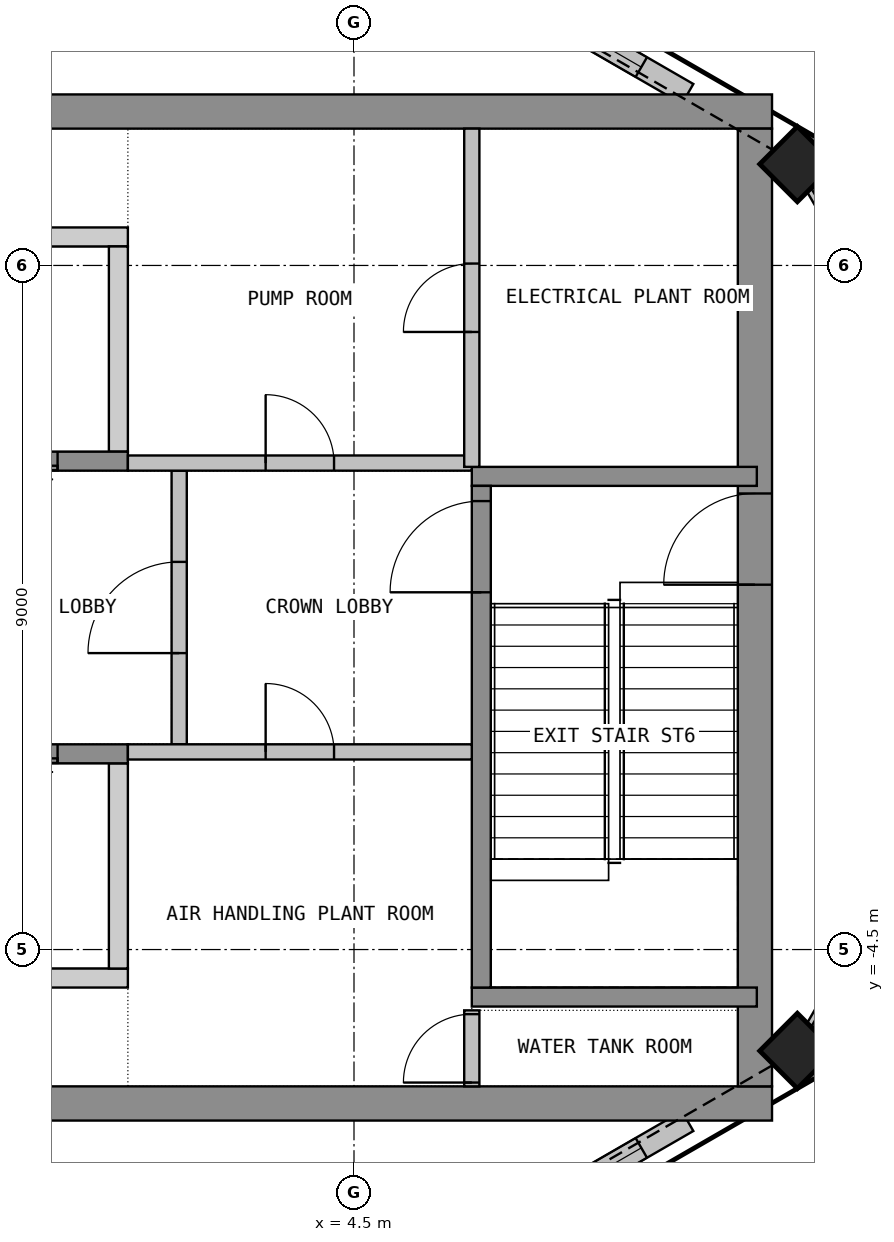
"""IFC4 building model, lengths in metres.
Left out: names, types, materials, properties, quantities, classifications, styles, units other than length and angle.
Written with IfcOpenShell. Run it as: python <this file> out.ifc"""

import sys

from ifc_helpers import new_model, si_unit, direction, frame, frame_2d, origin, origin_2d, place, context, subcontext, project, spatial, polyline, rectangle, outline, extrude, element, fill, save


model = new_model("IFC4")
c1 = context("Model", 3, precision=1e-05, world=origin(), true_north=direction((0.0, 1.0)))
c2 = subcontext(c1, "Body", "Model", "MODEL_VIEW")
j1 = project(units=[si_unit("LENGTHUNIT", "METRE"), si_unit("PLANEANGLEUNIT", "RADIAN")], contexts=[c1])
p1 = place(None, origin())
s1 = spatial("IfcSite", under=j1, at=p1, CompositionType="ELEMENT")
p2 = place(p1, origin())
s2 = spatial("IfcBuilding", under=s1, at=p2, CompositionType="ELEMENT")
p3 = place(p2, frame((0.0, 0.0, 332.4)))
s3 = spatial("IfcBuildingStorey", under=s2, at=p3, CompositionType="ELEMENT", Elevation=332.4)
for number, where, z_axis, x_axis in (
    (1, (10.333, -5.833, 0.0), (0.0, 0.0, 1.0), (0.707, 0.707, 0.0)),
    (2, (10.333, 5.833, 0.0), (0.0, 0.0, 1.0), (-0.707, 0.707, 0.0)),
):
    element("IfcColumn", number, at=place(p3, frame(where, z_axis=z_axis, x_axis=x_axis)), inside=s3, PredefinedType="COLUMN", context=c2, shape_type="SweptSolid", body=[
        extrude(rectangle(XDim=0.7, YDim=0.7, at=origin_2d()), origin(), (0.0, 0.0, 1.0), 4.05),
    ])
p4 = place(p3, frame((7.005, -7.846, 0.0), z_axis=(0.0, 0.0, 1.0), x_axis=(0.866060442015, 0.499939307093, 0.0)))
e3 = element("IfcWall", 3, at=p4, inside=s3, PredefinedType="SOLIDWALL", context=c2, shape_type="SweptSolid", body=[
    extrude(rectangle(XDim=2.177, YDim=0.3, at=frame_2d((1.088, 0.0))), origin(), (0.0, 0.0, 1.0), 3.15),
])
p5 = place(p4, frame((0.173, 0.0, 0.6)))
e4 = element("IfcOpeningElement", 4, at=p5, cuts=e3, PredefinedType="OPENING", context=c2, shape_type="SweptSolid", body=[
    extrude(rectangle(XDim=1.3, YDim=2.3, at=frame_2d((0.65, 1.15))), frame((0.0, 0.16, 0.0), z_axis=(0.0, -1.0, 0.0), x_axis=(1.0, 0.0, 0.0)), (0.0, 0.0, 1.0), 0.32),
])
p6 = place(p3, frame((10.592, -5.542, 0.0), z_axis=(0.0, 0.0, 1.0), x_axis=(0.499987607361, 0.86603255856, 0.0)))
e5 = element("IfcWall", 5, at=p6, inside=s3, PredefinedType="SOLIDWALL", context=c2, shape_type="SweptSolid", body=[
    extrude(rectangle(XDim=3.507, YDim=0.3, at=frame_2d((1.753, 0.0))), origin(), (0.0, 0.0, 1.0), 3.15),
])
p7 = place(p6, frame((0.553, 0.0, 0.6)))
e6 = element("IfcOpeningElement", 6, at=p7, cuts=e5, PredefinedType="OPENING", context=c2, shape_type="SweptSolid", body=[
    extrude(rectangle(XDim=2.4, YDim=2.3, at=frame_2d((1.2, 1.15))), frame((0.0, 0.16, 0.0), z_axis=(0.0, -1.0, 0.0), x_axis=(1.0, 0.0, 0.0)), (0.0, 0.0, 1.0), 0.32),
])
p8 = place(p3, frame((12.346, 2.505, 0.0), z_axis=(0.0, 0.0, 1.0), x_axis=(-0.499987607361, 0.86603255856, 0.0)))
e7 = element("IfcWall", 7, at=p8, inside=s3, PredefinedType="SOLIDWALL", context=c2, shape_type="SweptSolid", body=[
    extrude(rectangle(XDim=3.507, YDim=0.3, at=frame_2d((1.753, 0.0))), origin(), (0.0, 0.0, 1.0), 3.15),
])
p9 = place(p8, frame((0.553, 0.0, 0.6)))
e8 = element("IfcOpeningElement", 8, at=p9, cuts=e7, PredefinedType="OPENING", context=c2, shape_type="SweptSolid", body=[
    extrude(rectangle(XDim=2.4, YDim=2.3, at=frame_2d((1.2, 1.15))), frame((0.0, 0.16, 0.0), z_axis=(0.0, -1.0, 0.0), x_axis=(1.0, 0.0, 0.0)), (0.0, 0.0, 1.0), 0.32),
])
p10 = place(p3, frame((8.89, 6.758, 0.0), z_axis=(0.0, 0.0, 1.0), x_axis=(-0.866060442015, 0.499939307093, 0.0)))
e9 = element("IfcWall", 9, at=p10, inside=s3, PredefinedType="SOLIDWALL", context=c2, shape_type="SweptSolid", body=[
    extrude(rectangle(XDim=2.177, YDim=0.3, at=frame_2d((1.088, 0.0))), origin(), (0.0, 0.0, 1.0), 3.15),
])
p11 = place(p10, frame((0.704, 0.0, 0.6)))
e10 = element("IfcOpeningElement", 10, at=p11, cuts=e9, PredefinedType="OPENING", context=c2, shape_type="SweptSolid", body=[
    extrude(rectangle(XDim=1.3, YDim=2.3, at=frame_2d((0.65, 1.15))), frame((0.0, 0.16, 0.0), z_axis=(0.0, -1.0, 0.0), x_axis=(1.0, 0.0, 0.0)), (0.0, 0.0, 1.0), 0.32),
])
for number, where, z_axis, x_axis in (
    (11, (-10.0, 6.525, 0.0), (0.0, 0.0, 1.0), (1.0, 0.0, 0.0)),
    (12, (-10.0, -6.525, 0.0), (0.0, 0.0, 1.0), (1.0, 0.0, 0.0)),
):
    element("IfcWall", number, at=place(p3, frame(where, z_axis=z_axis, x_axis=x_axis)), inside=s3, PredefinedType="SHEAR", context=c2, shape_type="SweptSolid", body=[
        extrude(rectangle(XDim=20.0, YDim=0.45, at=frame_2d((10.0, 0.0))), origin(), (0.0, 0.0, 1.0), 4.05),
    ])
p12 = place(p3, frame((9.775, -6.3, 0.0), z_axis=(0.0, 0.0, 1.0), x_axis=(0.0, 1.0, 0.0)))
e13 = element("IfcWall", 13, at=p12, inside=s3, PredefinedType="SHEAR", context=c2, shape_type="SweptSolid", body=[
    extrude(rectangle(XDim=12.6, YDim=0.45, at=frame_2d((6.3, 0.0))), origin(), (0.0, 0.0, 1.0), 4.05),
])
p13 = place(p12, frame((6.6, 0.0, 0.0)))
e14 = element("IfcOpeningElement", 14, at=p13, cuts=e13, PredefinedType="OPENING", context=c2, shape_type="SweptSolid", body=[
    extrude(rectangle(XDim=1.2, YDim=2.1, at=frame_2d((0.6, 1.05))), frame((0.0, 0.235, 0.0), z_axis=(0.0, -1.0, 0.0), x_axis=(1.0, 0.0, 0.0)), (0.0, 0.0, 1.0), 0.47),
])
p14 = place(p3, origin())
e15 = element("IfcWall", 15, at=p14, inside=s3, PredefinedType="SHEAR", context=c2, shape_type="SweptSolid", body=[
    extrude(outline(polyline([(-1.525, 4.75), (1.525, 4.75), (1.525, 5.0), (-1.525, 5.0), (-1.525, 4.75)])), origin(), (0.0, 0.0, 1.0), 4.05),
])
p15 = place(p3, origin())
e16 = element("IfcWall", 16, at=p15, inside=s3, PredefinedType="SHEAR", context=c2, shape_type="SweptSolid", body=[
    extrude(outline(polyline([(1.275, 2.05), (1.525, 2.05), (1.525, 4.75), (1.275, 4.75), (1.275, 2.05)])), origin(), (0.0, 0.0, 1.0), 4.05),
])
p16 = place(p3, frame((-1.525, 1.925, 0.0), z_axis=(0.0, 0.0, 1.0), x_axis=(1.0, 0.0, 0.0)))
e17 = element("IfcWall", 17, at=p16, inside=s3, PredefinedType="SHEAR", context=c2, shape_type="SweptSolid", body=[
    extrude(rectangle(XDim=3.05, YDim=0.25, at=frame_2d((1.525, 0.0))), origin(), (0.0, 0.0, 1.0), 4.05),
])
p17 = place(p16, frame((0.925, 0.0, 0.0)))
e18 = element("IfcOpeningElement", 18, at=p17, cuts=e17, PredefinedType="OPENING", context=c2, shape_type="SweptSolid", body=[
    extrude(rectangle(XDim=1.2, YDim=2.1, at=frame_2d((0.6, 1.05))), frame((0.0, 0.135, 0.0), z_axis=(0.0, -1.0, 0.0), x_axis=(1.0, 0.0, 0.0)), (0.0, 0.0, 1.0), 0.27),
])
p18 = place(p3, origin())
e19 = element("IfcWall", 19, at=p18, inside=s3, PredefinedType="SHEAR", context=c2, shape_type="SweptSolid", body=[
    extrude(outline(polyline([(-1.525, -5.0), (1.525, -5.0), (1.525, -4.75), (-1.525, -4.75), (-1.525, -5.0)])), origin(), (0.0, 0.0, 1.0), 4.05),
])
p19 = place(p3, origin())
e20 = element("IfcWall", 20, at=p19, inside=s3, PredefinedType="SHEAR", context=c2, shape_type="SweptSolid", body=[
    extrude(outline(polyline([(1.275, -4.75), (1.525, -4.75), (1.525, -2.05), (1.275, -2.05), (1.275, -4.75)])), origin(), (0.0, 0.0, 1.0), 4.05),
])
p20 = place(p3, frame((-1.525, -1.925, 0.0), z_axis=(0.0, 0.0, 1.0), x_axis=(1.0, 0.0, 0.0)))
e21 = element("IfcWall", 21, at=p20, inside=s3, PredefinedType="SHEAR", context=c2, shape_type="SweptSolid", body=[
    extrude(rectangle(XDim=3.05, YDim=0.25, at=frame_2d((1.525, 0.0))), origin(), (0.0, 0.0, 1.0), 4.05),
])
p21 = place(p20, frame((0.925, 0.0, 0.0)))
e22 = element("IfcOpeningElement", 22, at=p21, cuts=e21, PredefinedType="OPENING", context=c2, shape_type="SweptSolid", body=[
    extrude(rectangle(XDim=1.2, YDim=2.1, at=frame_2d((0.6, 1.05))), frame((0.0, 0.135, 0.0), z_axis=(0.0, -1.0, 0.0), x_axis=(1.0, 0.0, 0.0)), (0.0, 0.0, 1.0), 0.27),
])
p22 = place(p3, frame((2.2, -1.8, 0.0), z_axis=(0.0, 0.0, 1.0), x_axis=(0.0, 1.0, 0.0)))
e23 = element("IfcWall", 23, at=p22, inside=s3, PredefinedType="PARTITIONING", context=c2, shape_type="SweptSolid", body=[
    extrude(rectangle(XDim=3.6, YDim=0.2, at=frame_2d((1.8, 0.0))), origin(), (0.0, 0.0, 1.0), 4.05),
])
p23 = place(p22, frame((1.2, 0.0, 0.0)))
e24 = element("IfcOpeningElement", 24, at=p23, cuts=e23, PredefinedType="OPENING", context=c2, shape_type="SweptSolid", body=[
    extrude(rectangle(XDim=1.2, YDim=2.1, at=frame_2d((0.6, 1.05))), frame((0.0, 0.11, 0.0), z_axis=(0.0, -1.0, 0.0), x_axis=(1.0, 0.0, 0.0)), (0.0, 0.0, 1.0), 0.22),
])
for number, where, z_axis, x_axis in (
    (25, (6.05, -5.125, 0.0), (0.0, 0.0, 1.0), (1.0, 0.0, 0.0)),
    (26, (6.05, 1.725, 0.0), (0.0, 0.0, 1.0), (1.0, 0.0, 0.0)),
):
    element("IfcWall", number, at=place(p3, frame(where, z_axis=z_axis, x_axis=x_axis)), inside=s3, PredefinedType="SHEAR", context=c2, shape_type="SweptSolid", body=[
        extrude(rectangle(XDim=3.75, YDim=0.25, at=frame_2d((1.875, 0.0))), origin(), (0.0, 0.0, 1.0), 4.05),
    ])
p24 = place(p3, frame((6.175, -5.0, 0.0), z_axis=(0.0, 0.0, 1.0), x_axis=(0.0, 1.0, 0.0)))
e27 = element("IfcWall", 27, at=p24, inside=s3, PredefinedType="SHEAR", context=c2, shape_type="SweptSolid", body=[
    extrude(rectangle(XDim=6.6, YDim=0.25, at=frame_2d((3.3, 0.0))), origin(), (0.0, 0.0, 1.0), 4.05),
])
p25 = place(p24, frame((5.2, 0.0, 0.0)))
e28 = element("IfcOpeningElement", 28, at=p25, cuts=e27, PredefinedType="OPENING", context=c2, shape_type="SweptSolid", body=[
    extrude(rectangle(XDim=1.2, YDim=2.1, at=frame_2d((0.6, 1.05))), frame((0.0, 0.135, 0.0), z_axis=(0.0, -1.0, 0.0), x_axis=(1.0, 0.0, 0.0)), (0.0, 0.0, 1.0), 0.27),
])
p26 = place(p3, frame((1.525, 1.9, 0.0), z_axis=(0.0, 0.0, 1.0), x_axis=(1.0, 0.0, 0.0)))
e29 = element("IfcWall", 29, at=p26, inside=s3, PredefinedType="PARTITIONING", context=c2, shape_type="SweptSolid", body=[
    extrude(rectangle(XDim=4.525, YDim=0.2, at=frame_2d((2.263, 0.0))), origin(), (0.0, 0.0, 1.0), 4.05),
])
p27 = place(p26, frame((1.812, 0.0, 0.0)))
e30 = element("IfcOpeningElement", 30, at=p27, cuts=e29, PredefinedType="OPENING", context=c2, shape_type="SweptSolid", body=[
    extrude(rectangle(XDim=0.9, YDim=2.1, at=frame_2d((0.45, 1.05))), frame((0.0, 0.11, 0.0), z_axis=(0.0, -1.0, 0.0), x_axis=(1.0, 0.0, 0.0)), (0.0, 0.0, 1.0), 0.22),
])
p28 = place(p3, frame((1.525, -1.9, 0.0), z_axis=(0.0, 0.0, 1.0), x_axis=(1.0, 0.0, 0.0)))
e31 = element("IfcWall", 31, at=p28, inside=s3, PredefinedType="PARTITIONING", context=c2, shape_type="SweptSolid", body=[
    extrude(rectangle(XDim=4.525, YDim=0.2, at=frame_2d((2.263, 0.0))), origin(), (0.0, 0.0, 1.0), 4.05),
])
p29 = place(p28, frame((1.812, 0.0, 0.0)))
e32 = element("IfcOpeningElement", 32, at=p29, cuts=e31, PredefinedType="OPENING", context=c2, shape_type="SweptSolid", body=[
    extrude(rectangle(XDim=0.9, YDim=2.1, at=frame_2d((0.45, 1.05))), frame((0.0, 0.11, 0.0), z_axis=(0.0, -1.0, 0.0), x_axis=(1.0, 0.0, 0.0)), (0.0, 0.0, 1.0), 0.22),
])
p30 = place(p3, frame((6.05, 1.85, 0.0), z_axis=(0.0, 0.0, 1.0), x_axis=(0.0, 1.0, 0.0)))
e33 = element("IfcWall", 33, at=p30, inside=s3, PredefinedType="PARTITIONING", context=c2, shape_type="SweptSolid", body=[
    extrude(rectangle(XDim=4.45, YDim=0.2, at=frame_2d((2.225, 0.0))), origin(), (0.0, 0.0, 1.0), 4.05),
])
p31 = place(p30, frame((1.775, 0.0, 0.0)))
e34 = element("IfcOpeningElement", 34, at=p31, cuts=e33, PredefinedType="OPENING", context=c2, shape_type="SweptSolid", body=[
    extrude(rectangle(XDim=0.9, YDim=2.1, at=frame_2d((0.45, 1.05))), frame((0.0, 0.11, 0.0), z_axis=(0.0, -1.0, 0.0), x_axis=(1.0, 0.0, 0.0)), (0.0, 0.0, 1.0), 0.22),
])
p32 = place(p3, frame((6.05, -6.3, 0.0), z_axis=(0.0, 0.0, 1.0), x_axis=(0.0, 1.0, 0.0)))
e35 = element("IfcWall", 35, at=p32, inside=s3, PredefinedType="PARTITIONING", context=c2, shape_type="SweptSolid", body=[
    extrude(rectangle(XDim=1.0, YDim=0.2, at=frame_2d((0.5, 0.0))), origin(), (0.0, 0.0, 1.0), 4.05),
])
p33 = place(p32, frame((0.05, 0.0, 0.0)))
e36 = element("IfcOpeningElement", 36, at=p33, cuts=e35, PredefinedType="OPENING", context=c2, shape_type="SweptSolid", body=[
    extrude(rectangle(XDim=0.9, YDim=2.1, at=frame_2d((0.45, 1.05))), frame((0.0, 0.11, 0.0), z_axis=(0.0, -1.0, 0.0), x_axis=(1.0, 0.0, 0.0)), (0.0, 0.0, 1.0), 0.22),
])
p34 = place(p5, origin())
e37 = element("IfcWindow", 37, at=p34, inside=s3, PartitioningType="SINGLE_PANEL", PredefinedType="WINDOW", context=c2, shape_type="SweptSolid", body=[
    extrude(rectangle(XDim=1.3, YDim=2.3, at=frame_2d((0.65, 1.15))), frame((0.0, 0.03, 0.0), z_axis=(0.0, -1.0, 0.0), x_axis=(1.0, 0.0, 0.0)), (0.0, 0.0, 1.0), 0.06),
])
fill(e4, e37)
p35 = place(p11, origin())
e38 = element("IfcWindow", 38, at=p35, inside=s3, PartitioningType="SINGLE_PANEL", PredefinedType="WINDOW", context=c2, shape_type="SweptSolid", body=[
    extrude(rectangle(XDim=1.3, YDim=2.3, at=frame_2d((0.65, 1.15))), frame((0.0, 0.03, 0.0), z_axis=(0.0, -1.0, 0.0), x_axis=(1.0, 0.0, 0.0)), (0.0, 0.0, 1.0), 0.06),
])
fill(e10, e38)
p36 = place(p13, origin())
e39 = element("IfcDoor", 39, at=p36, inside=s3, OperationType="SINGLE_SWING_RIGHT", PredefinedType="DOOR", context=c2, shape_type="SweptSolid", body=[
    extrude(rectangle(XDim=1.2, YDim=2.1, at=frame_2d((0.6, 1.05))), frame((0.0, 0.025, 0.0), z_axis=(0.0, -1.0, 0.0), x_axis=(1.0, 0.0, 0.0)), (0.0, 0.0, 1.0), 0.05),
])
fill(e14, e39)
p37 = place(p17, origin())
e40 = element("IfcDoor", 40, at=p37, inside=s3, OperationType="DOUBLE_DOOR_SLIDING", PredefinedType="DOOR", context=c2, shape_type="SweptSolid", body=[
    extrude(rectangle(XDim=1.2, YDim=2.1, at=frame_2d((0.6, 1.05))), frame((0.0, 0.025, 0.0), z_axis=(0.0, -1.0, 0.0), x_axis=(1.0, 0.0, 0.0)), (0.0, 0.0, 1.0), 0.05),
])
fill(e18, e40)
p38 = place(p21, origin())
e41 = element("IfcDoor", 41, at=p38, inside=s3, OperationType="DOUBLE_DOOR_SLIDING", PredefinedType="DOOR", context=c2, shape_type="SweptSolid", body=[
    extrude(rectangle(XDim=1.2, YDim=2.1, at=frame_2d((0.6, 1.05))), frame((0.0, 0.025, 0.0), z_axis=(0.0, -1.0, 0.0), x_axis=(1.0, 0.0, 0.0)), (0.0, 0.0, 1.0), 0.05),
])
fill(e22, e41)
p39 = place(p23, origin())
e42 = element("IfcDoor", 42, at=p39, inside=s3, OperationType="SINGLE_SWING_LEFT", PredefinedType="DOOR", context=c2, shape_type="SweptSolid", body=[
    extrude(rectangle(XDim=1.2, YDim=2.1, at=frame_2d((0.6, 1.05))), frame((0.0, 0.025, 0.0), z_axis=(0.0, -1.0, 0.0), x_axis=(1.0, 0.0, 0.0)), (0.0, 0.0, 1.0), 0.05),
])
fill(e24, e42)
p40 = place(p25, origin())
e43 = element("IfcDoor", 43, at=p40, inside=s3, OperationType="SINGLE_SWING_LEFT", PredefinedType="DOOR", context=c2, shape_type="SweptSolid", body=[
    extrude(rectangle(XDim=1.2, YDim=2.1, at=frame_2d((0.6, 1.05))), frame((0.0, 0.025, 0.0), z_axis=(0.0, -1.0, 0.0), x_axis=(1.0, 0.0, 0.0)), (0.0, 0.0, 1.0), 0.05),
])
fill(e28, e43)
p41 = place(p27, origin())
e44 = element("IfcDoor", 44, at=p41, inside=s3, OperationType="SINGLE_SWING_LEFT", PredefinedType="DOOR", context=c2, shape_type="SweptSolid", body=[
    extrude(rectangle(XDim=0.9, YDim=2.1, at=frame_2d((0.45, 1.05))), frame((0.0, 0.025, 0.0), z_axis=(0.0, -1.0, 0.0), x_axis=(1.0, 0.0, 0.0)), (0.0, 0.0, 1.0), 0.05),
])
fill(e30, e44)
p42 = place(p29, origin())
e45 = element("IfcDoor", 45, at=p42, inside=s3, OperationType="SINGLE_SWING_LEFT", PredefinedType="DOOR", context=c2, shape_type="SweptSolid", body=[
    extrude(rectangle(XDim=0.9, YDim=2.1, at=frame_2d((0.45, 1.05))), frame((0.0, 0.025, 0.0), z_axis=(0.0, -1.0, 0.0), x_axis=(1.0, 0.0, 0.0)), (0.0, 0.0, 1.0), 0.05),
])
fill(e32, e45)
p43 = place(p31, origin())
e46 = element("IfcDoor", 46, at=p43, inside=s3, OperationType="SINGLE_SWING_LEFT", PredefinedType="DOOR", context=c2, shape_type="SweptSolid", body=[
    extrude(rectangle(XDim=0.9, YDim=2.1, at=frame_2d((0.45, 1.05))), frame((0.0, 0.025, 0.0), z_axis=(0.0, -1.0, 0.0), x_axis=(1.0, 0.0, 0.0)), (0.0, 0.0, 1.0), 0.05),
])
fill(e34, e46)
p44 = place(p33, origin())
e47 = element("IfcDoor", 47, at=p44, inside=s3, OperationType="SINGLE_SWING_LEFT", PredefinedType="DOOR", context=c2, shape_type="SweptSolid", body=[
    extrude(rectangle(XDim=0.9, YDim=2.1, at=frame_2d((0.45, 1.05))), frame((0.0, 0.025, 0.0), z_axis=(0.0, -1.0, 0.0), x_axis=(1.0, 0.0, 0.0)), (0.0, 0.0, 1.0), 0.05),
])
fill(e36, e47)
save(model, sys.argv[1])
